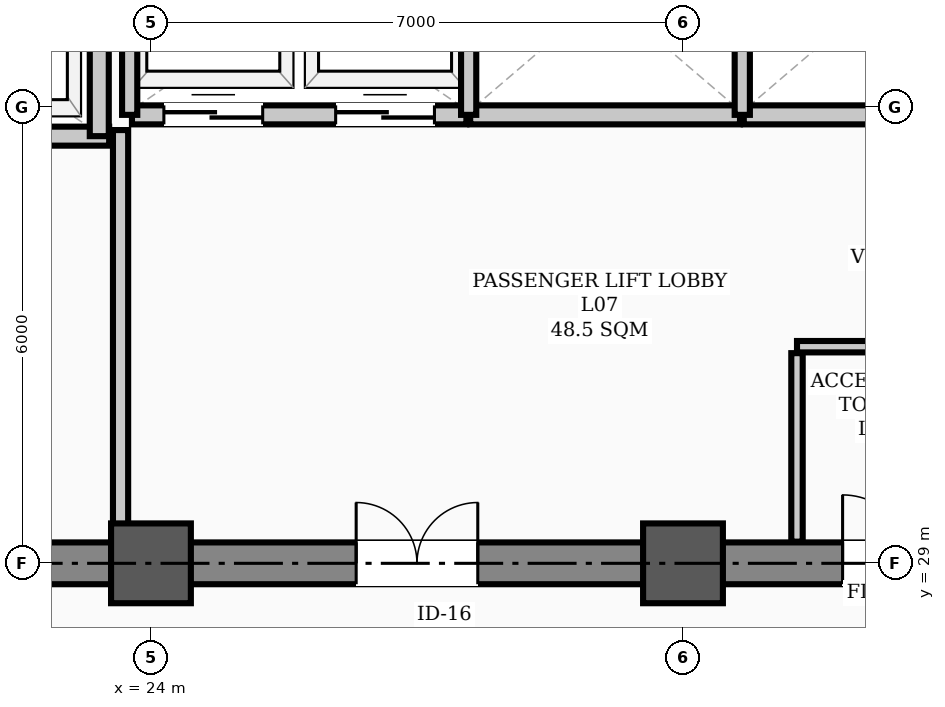
"""IFC4 building model, lengths in metres.
Left out: names, types, materials, properties, quantities, classifications, styles, units other than length and angle.
Written with IfcOpenShell. Run it as: python <this file> out.ifc"""

import sys

from ifc_helpers import new_model, si_unit, direction, frame, frame_2d, origin, origin_2d, place, context, subcontext, project, spatial, rectangle, hollow_rectangle, extrude, element, fill, save


model = new_model("IFC4")
c1 = context("Model", 3, precision=1e-05, world=origin(), true_north=direction((0.0, 1.0)))
c2 = subcontext(c1, "Body", "Model", "MODEL_VIEW")
j1 = project(units=[si_unit("LENGTHUNIT", "METRE"), si_unit("PLANEANGLEUNIT", "RADIAN")], contexts=[c1])
p1 = place(None, origin())
s1 = spatial("IfcSite", under=j1, at=p1, CompositionType="ELEMENT")
p2 = place(p1, origin())
s2 = spatial("IfcBuilding", under=s1, at=p2, CompositionType="ELEMENT")
p3 = place(p2, frame((0.0, 0.0, 30.4)))
s3 = spatial("IfcBuildingStorey", under=s2, at=p3, CompositionType="ELEMENT", Elevation=30.4)
for number, where, z_axis, x_axis in (
    (1, (24.0, 29.0, 0.0), (0.0, 0.0, 1.0), (1.0, 0.0, 0.0)),
    (2, (31.0, 29.0, 0.0), (0.0, 0.0, 1.0), (1.0, 0.0, 0.0)),
):
    element("IfcColumn", number, at=place(p3, frame(where, z_axis=z_axis, x_axis=x_axis)), inside=s3, PredefinedType="COLUMN", context=c2, shape_type="SweptSolid", body=[
        extrude(hollow_rectangle(XDim=1.05, YDim=1.05, WallThickness=0.038, InnerFilletRadius=0.019, OuterFilletRadius=0.057, at=origin_2d()), origin(), (0.0, 0.0, 1.0), 3.9),
    ])
p4 = place(p3, frame((13.5, 29.0, 0.0), z_axis=(0.0, 0.0, 1.0), x_axis=(1.0, 0.0, 0.0)))
e3 = element("IfcWall", 3, at=p4, inside=s3, PredefinedType="SHEAR", context=c2, shape_type="SweptSolid", body=[
    extrude(rectangle(XDim=30.5, YDim=0.55, at=frame_2d((15.25, 0.0))), origin(), (0.0, 0.0, 1.0), 3.72),
])
p5 = place(p4, frame((1.75, 0.0, 0.0)))
e4 = element("IfcOpeningElement", 4, at=p5, cuts=e3, PredefinedType="OPENING", context=c2, shape_type="SweptSolid", body=[
    extrude(rectangle(XDim=1.1, YDim=2.08, at=frame_2d((0.55, 1.04))), frame((0.0, 0.285, 0.0), z_axis=(0.0, -1.0, 0.0), x_axis=(1.0, 0.0, 0.0)), (0.0, 0.0, 1.0), 0.57),
])
p6 = place(p4, frame((26.7, 0.0, 0.0)))
e5 = element("IfcOpeningElement", 5, at=p6, cuts=e3, PredefinedType="OPENING", context=c2, shape_type="SweptSolid", body=[
    extrude(rectangle(XDim=1.1, YDim=2.08, at=frame_2d((0.55, 1.04))), frame((0.0, 0.285, 0.0), z_axis=(0.0, -1.0, 0.0), x_axis=(1.0, 0.0, 0.0)), (0.0, 0.0, 1.0), 0.57),
])
p7 = place(p4, frame((6.8, 0.0, 0.0)))
e6 = element("IfcOpeningElement", 6, at=p7, cuts=e3, PredefinedType="OPENING", context=c2, shape_type="SweptSolid", body=[
    extrude(rectangle(XDim=1.1, YDim=2.08, at=frame_2d((0.55, 1.04))), frame((0.0, 0.285, 0.0), z_axis=(0.0, -1.0, 0.0), x_axis=(1.0, 0.0, 0.0)), (0.0, 0.0, 1.0), 0.57),
])
p8 = place(p4, frame((13.2, 0.0, 0.0)))
e7 = element("IfcOpeningElement", 7, at=p8, cuts=e3, PredefinedType="OPENING", context=c2, shape_type="SweptSolid", body=[
    extrude(rectangle(XDim=1.6, YDim=2.08, at=frame_2d((0.8, 1.04))), frame((0.0, 0.285, 0.0), z_axis=(0.0, -1.0, 0.0), x_axis=(1.0, 0.0, 0.0)), (0.0, 0.0, 1.0), 0.57),
])
p9 = place(p4, frame((19.6, 0.0, 0.0)))
e8 = element("IfcOpeningElement", 8, at=p9, cuts=e3, PredefinedType="OPENING", context=c2, shape_type="SweptSolid", body=[
    extrude(rectangle(XDim=0.9, YDim=2.08, at=frame_2d((0.45, 1.04))), frame((0.0, 0.285, 0.0), z_axis=(0.0, -1.0, 0.0), x_axis=(1.0, 0.0, 0.0)), (0.0, 0.0, 1.0), 0.57),
])
p10 = place(p4, frame((21.6, 0.0, 0.0)))
e9 = element("IfcOpeningElement", 9, at=p10, cuts=e3, PredefinedType="OPENING", context=c2, shape_type="SweptSolid", body=[
    extrude(rectangle(XDim=0.9, YDim=2.08, at=frame_2d((0.45, 1.04))), frame((0.0, 0.285, 0.0), z_axis=(0.0, -1.0, 0.0), x_axis=(1.0, 0.0, 0.0)), (0.0, 0.0, 1.0), 0.57),
])
p11 = place(p3, frame((18.1, 34.62, 0.0), z_axis=(0.0, 0.0, 1.0), x_axis=(1.0, 0.0, 0.0)))
e10 = element("IfcWall", 10, at=p11, inside=s3, PredefinedType="STANDARD", context=c2, shape_type="SweptSolid", body=[
    extrude(rectangle(XDim=5.35, YDim=0.25, at=frame_2d((2.675, 0.0))), origin(), (0.0, 0.0, 1.0), 3.72),
])
p12 = place(p11, frame((0.85, 0.0, 0.0)))
e11 = element("IfcOpeningElement", 11, at=p12, cuts=e10, PredefinedType="OPENING", context=c2, shape_type="SweptSolid", body=[
    extrude(rectangle(XDim=1.1, YDim=2.08, at=frame_2d((0.55, 1.04))), frame((0.0, 0.135, 0.0), z_axis=(0.0, -1.0, 0.0), x_axis=(1.0, 0.0, 0.0)), (0.0, 0.0, 1.0), 0.27),
])
p13 = place(p11, frame((3.45, 0.0, 0.0)))
e12 = element("IfcOpeningElement", 12, at=p13, cuts=e10, PredefinedType="OPENING", context=c2, shape_type="SweptSolid", body=[
    extrude(rectangle(XDim=1.1, YDim=2.08, at=frame_2d((0.55, 1.04))), frame((0.0, 0.135, 0.0), z_axis=(0.0, -1.0, 0.0), x_axis=(1.0, 0.0, 0.0)), (0.0, 0.0, 1.0), 0.27),
])
p14 = place(p3, frame((23.32, 34.62, 0.0), z_axis=(0.0, 0.0, 1.0), x_axis=(0.0, 1.0, 0.0)))
e13 = element("IfcWall", 13, at=p14, inside=s3, PredefinedType="STANDARD", context=c2, shape_type="SweptSolid", body=[
    extrude(rectangle(XDim=3.33, YDim=0.25, at=frame_2d((1.665, 0.0))), origin(), (0.0, 0.0, 1.0), 3.3),
])
p15 = place(p3, frame((23.75, 34.9, 0.0), z_axis=(0.0, 0.0, 1.0), x_axis=(1.0, 0.0, 0.0)))
e14 = element("IfcWall", 14, at=p15, inside=s3, PredefinedType="STANDARD", context=c2, shape_type="SweptSolid", body=[
    extrude(rectangle(XDim=4.4, YDim=0.25, at=frame_2d((2.2, 0.0))), origin(), (0.0, 0.0, 1.0), 3.72),
])
p16 = place(p15, frame((0.42, 0.0, 0.0)))
e15 = element("IfcOpeningElement", 15, at=p16, cuts=e14, PredefinedType="OPENING", context=c2, shape_type="SweptSolid", body=[
    extrude(rectangle(XDim=1.3, YDim=2.08, at=frame_2d((0.65, 1.04))), frame((0.0, 0.135, 0.0), z_axis=(0.0, -1.0, 0.0), x_axis=(1.0, 0.0, 0.0)), (0.0, 0.0, 1.0), 0.27),
])
p17 = place(p15, frame((2.68, 0.0, 0.0)))
e16 = element("IfcOpeningElement", 16, at=p17, cuts=e14, PredefinedType="OPENING", context=c2, shape_type="SweptSolid", body=[
    extrude(rectangle(XDim=1.3, YDim=2.08, at=frame_2d((0.65, 1.04))), frame((0.0, 0.135, 0.0), z_axis=(0.0, -1.0, 0.0), x_axis=(1.0, 0.0, 0.0)), (0.0, 0.0, 1.0), 0.27),
])
p18 = place(p3, frame((28.2, 34.9, 0.0), z_axis=(0.0, 0.0, 1.0), x_axis=(1.0, 0.0, 0.0)))
e17 = element("IfcWall", 17, at=p18, inside=s3, PredefinedType="STANDARD", context=c2, shape_type="SweptSolid", body=[
    extrude(rectangle(XDim=3.55, YDim=0.25, at=frame_2d((1.775, 0.0))), origin(), (0.0, 0.0, 1.0), 3.72),
])
p19 = place(p3, frame((31.8, 34.9, 0.0), z_axis=(0.0, 0.0, 1.0), x_axis=(1.0, 0.0, 0.0)))
e18 = element("IfcWall", 18, at=p19, inside=s3, PredefinedType="STANDARD", context=c2, shape_type="SweptSolid", body=[
    extrude(rectangle(XDim=3.6, YDim=0.25, at=frame_2d((1.8, 0.0))), origin(), (0.0, 0.0, 1.0), 3.72),
])
p20 = place(p3, frame((32.5, 31.85, 0.0), z_axis=(0.0, 0.0, 1.0), x_axis=(1.0, 0.0, 0.0)))
e19 = element("IfcWall", 19, at=p20, inside=s3, PredefinedType="PARTITIONING", context=c2, shape_type="SweptSolid", body=[
    extrude(rectangle(XDim=4.1, YDim=0.15, at=frame_2d((2.05, 0.0))), origin(), (0.0, 0.0, 1.0), 3.72),
])
p21 = place(p3, frame((23.6, 29.285, 0.0), z_axis=(0.0, 0.0, 1.0), x_axis=(0.0, 1.0, 0.0)))
e20 = element("IfcWall", 20, at=p21, inside=s3, PredefinedType="STANDARD", context=c2, shape_type="SweptSolid", body=[
    extrude(rectangle(XDim=5.415, YDim=0.2, at=frame_2d((2.708, 0.0))), origin(), (0.0, 0.0, 1.0), 3.1),
])
p22 = place(p3, frame((32.5, 29.285, 0.0), z_axis=(0.0, 0.0, 1.0), x_axis=(0.0, 1.0, 0.0)))
e21 = element("IfcWall", 21, at=p22, inside=s3, PredefinedType="PARTITIONING", context=c2, shape_type="SweptSolid", body=[
    extrude(rectangle(XDim=2.48, YDim=0.15, at=frame_2d((1.24, 0.0))), origin(), (0.0, 0.0, 1.0), 3.3),
])
p23 = place(p3, frame((23.72, 34.9, 0.0), z_axis=(0.0, 0.0, 1.0), x_axis=(0.0, 1.0, 0.0)))
e22 = element("IfcWall", 22, at=p23, inside=s3, PredefinedType="STANDARD", context=c2, shape_type="SweptSolid", body=[
    extrude(rectangle(XDim=3.12, YDim=0.2, at=frame_2d((1.56, 0.0))), origin(), (0.0, 0.0, 1.0), 3.1),
])
for number, where, z_axis, x_axis in (
    (23, (28.18, 34.9, 0.0), (0.0, 0.0, 1.0), (0.0, 1.0, 0.0)),
    (24, (31.78, 34.9, 0.0), (0.0, 0.0, 1.0), (0.0, 1.0, 0.0)),
):
    element("IfcWall", number, at=place(p3, frame(where, z_axis=z_axis, x_axis=x_axis)), inside=s3, PredefinedType="STANDARD", context=c2, shape_type="SweptSolid", body=[
        extrude(rectangle(XDim=3.12, YDim=0.2, at=frame_2d((1.56, 0.0))), origin(), (0.0, 0.0, 1.0), 3.3),
    ])
p24 = place(p8, origin())
e25 = element("IfcDoor", 25, at=p24, inside=s3, OperationType="DOUBLE_DOOR_SINGLE_SWING", PredefinedType="DOOR", context=c2, shape_type="SweptSolid", body=[
    extrude(rectangle(XDim=1.6, YDim=2.08, at=frame_2d((0.8, 1.04))), frame((0.0, 0.025, 0.0), z_axis=(0.0, -1.0, 0.0), x_axis=(1.0, 0.0, 0.0)), (0.0, 0.0, 1.0), 0.05),
])
fill(e7, e25)
p25 = place(p9, origin())
e26 = element("IfcDoor", 26, at=p25, inside=s3, OperationType="SINGLE_SWING_LEFT", PredefinedType="DOOR", context=c2, shape_type="SweptSolid", body=[
    extrude(rectangle(XDim=0.9, YDim=2.08, at=frame_2d((0.45, 1.04))), frame((0.0, 0.025, 0.0), z_axis=(0.0, -1.0, 0.0), x_axis=(1.0, 0.0, 0.0)), (0.0, 0.0, 1.0), 0.05),
])
fill(e8, e26)
p26 = place(p16, origin())
e27 = element("IfcDoor", 27, at=p26, inside=s3, OperationType="DOUBLE_DOOR_SLIDING", PredefinedType="DOOR", context=c2, shape_type="SweptSolid", body=[
    extrude(rectangle(XDim=1.3, YDim=2.08, at=frame_2d((0.65, 1.04))), frame((0.0, 0.025, 0.0), z_axis=(0.0, -1.0, 0.0), x_axis=(1.0, 0.0, 0.0)), (0.0, 0.0, 1.0), 0.05),
])
fill(e15, e27)
p27 = place(p17, origin())
e28 = element("IfcDoor", 28, at=p27, inside=s3, OperationType="DOUBLE_DOOR_SLIDING", PredefinedType="DOOR", context=c2, shape_type="SweptSolid", body=[
    extrude(rectangle(XDim=1.3, YDim=2.08, at=frame_2d((0.65, 1.04))), frame((0.0, 0.025, 0.0), z_axis=(0.0, -1.0, 0.0), x_axis=(1.0, 0.0, 0.0)), (0.0, 0.0, 1.0), 0.05),
])
fill(e16, e28)
save(model, sys.argv[1])
